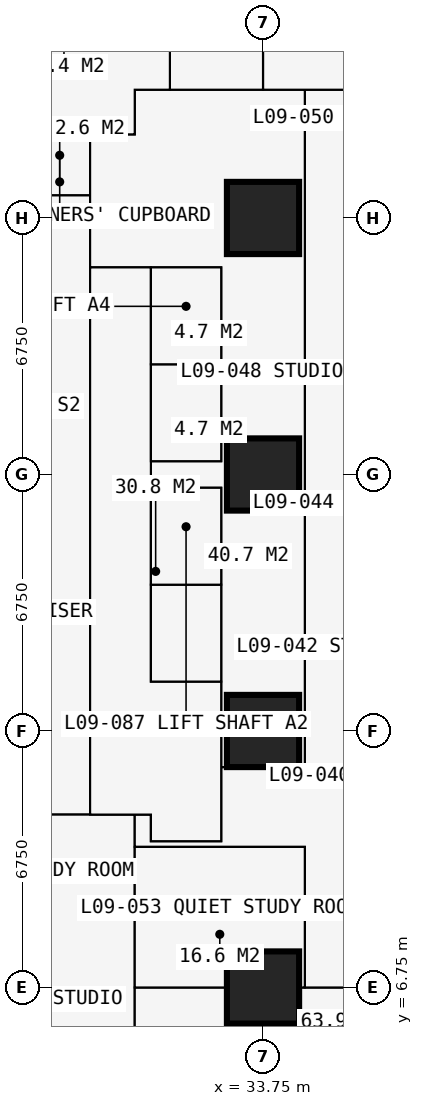
"""IFC4 building model, lengths in metres.
Left out: names, types, materials, properties, quantities, classifications, styles, units other than length and angle.
Written with IfcOpenShell. Run it as: python <this file> out.ifc"""

import sys

from ifc_helpers import new_model, si_unit, direction, frame, frame_2d, origin, origin_2d, place, context, subcontext, project, spatial, rectangle, extrude, element, fill, save


model = new_model("IFC4")
c1 = context("Model", 3, precision=1e-05, world=origin(), true_north=direction((0.0, 1.0)))
c2 = subcontext(c1, "Body", "Model", "MODEL_VIEW")
j1 = project(units=[si_unit("LENGTHUNIT", "METRE"), si_unit("PLANEANGLEUNIT", "RADIAN")], contexts=[c1])
p1 = place(None, origin())
s1 = spatial("IfcSite", under=j1, at=p1, CompositionType="ELEMENT")
p2 = place(p1, origin())
s2 = spatial("IfcBuilding", under=s1, at=p2, CompositionType="ELEMENT")
p3 = place(p2, frame((0.0, 0.0, 36.0)))
s3 = spatial("IfcBuildingStorey", under=s2, at=p3, CompositionType="ELEMENT", Elevation=36.0)
for number, where, z_axis, x_axis in (
    (1, (33.75, 6.75, 0.0), (0.0, 0.0, 1.0), (1.0, 0.0, 0.0)),
    (2, (33.75, 13.5, 0.0), (0.0, 0.0, 1.0), (1.0, 0.0, 0.0)),
    (3, (33.75, 20.25, 0.0), (0.0, 0.0, 1.0), (1.0, 0.0, 0.0)),
    (4, (33.75, 27.0, 0.0), (0.0, 0.0, 1.0), (1.0, 0.0, 0.0)),
):
    element("IfcColumn", number, at=place(p3, frame(where, z_axis=z_axis, x_axis=x_axis)), inside=s3, PredefinedType="COLUMN", context=c2, shape_type="SweptSolid", body=[
        extrude(rectangle(XDim=1.9, YDim=1.9, at=origin_2d()), origin(), (0.0, 0.0, 1.0), 3.6),
    ])
p4 = place(p3, frame((10.125, 11.3, 0.0), z_axis=(0.0, 0.0, 1.0), x_axis=(1.0, 0.0, 0.0)))
e5 = element("IfcWall", 5, at=p4, inside=s3, PredefinedType="PARTITIONING", context=c2, shape_type="SweptSolid", body=[
    extrude(rectangle(XDim=20.675, YDim=0.15, at=frame_2d((10.337, 0.0))), origin(), (0.0, 0.0, 1.0), 3.375),
])
p5 = place(p4, frame((5.2, 0.0, 0.0)))
e6 = element("IfcOpeningElement", 6, at=p5, cuts=e5, PredefinedType="OPENING", context=c2, shape_type="SweptSolid", body=[
    extrude(rectangle(XDim=1.0, YDim=2.2, at=frame_2d((0.5, 1.1))), frame((0.0, 0.085, 0.0), z_axis=(0.0, -1.0, 0.0), x_axis=(1.0, 0.0, 0.0)), (0.0, 0.0, 1.0), 0.17),
])
p6 = place(p4, frame((11.312, 0.0, 0.0)))
e7 = element("IfcOpeningElement", 7, at=p6, cuts=e5, PredefinedType="OPENING", context=c2, shape_type="SweptSolid", body=[
    extrude(rectangle(XDim=1.0, YDim=2.2, at=frame_2d((0.5, 1.1))), frame((0.0, 0.085, 0.0), z_axis=(0.0, -1.0, 0.0), x_axis=(1.0, 0.0, 0.0)), (0.0, 0.0, 1.0), 0.17),
])
p7 = place(p4, frame((2.425, 0.0, 0.0)))
e8 = element("IfcOpeningElement", 8, at=p7, cuts=e5, PredefinedType="OPENING", context=c2, shape_type="SweptSolid", body=[
    extrude(rectangle(XDim=0.95, YDim=2.2, at=frame_2d((0.475, 1.1))), frame((0.0, 0.085, 0.0), z_axis=(0.0, -1.0, 0.0), x_axis=(1.0, 0.0, 0.0)), (0.0, 0.0, 1.0), 0.17),
])
p8 = place(p3, frame((11.3, 29.2, 0.0), z_axis=(0.0, 0.0, 1.0), x_axis=(1.0, 0.0, 0.0)))
e9 = element("IfcWall", 9, at=p8, inside=s3, PredefinedType="PARTITIONING", context=c2, shape_type="SweptSolid", body=[
    extrude(rectangle(XDim=19.075, YDim=0.15, at=frame_2d((9.538, 0.0))), origin(), (0.0, 0.0, 1.0), 3.375),
])
p9 = place(p8, frame((12.875, 0.0, 0.0)))
e10 = element("IfcOpeningElement", 10, at=p9, cuts=e9, PredefinedType="OPENING", context=c2, shape_type="SweptSolid", body=[
    extrude(rectangle(XDim=1.0, YDim=2.2, at=frame_2d((0.5, 1.1))), frame((0.0, 0.085, 0.0), z_axis=(0.0, -1.0, 0.0), x_axis=(1.0, 0.0, 0.0)), (0.0, 0.0, 1.0), 0.17),
])
p10 = place(p8, frame((10.438, 0.0, 0.0)))
e11 = element("IfcOpeningElement", 11, at=p10, cuts=e9, PredefinedType="OPENING", context=c2, shape_type="SweptSolid", body=[
    extrude(rectangle(XDim=1.0, YDim=2.2, at=frame_2d((0.5, 1.1))), frame((0.0, 0.085, 0.0), z_axis=(0.0, -1.0, 0.0), x_axis=(1.0, 0.0, 0.0)), (0.0, 0.0, 1.0), 0.17),
])
p11 = place(p8, frame((14.875, 0.0, 0.0)))
e12 = element("IfcOpeningElement", 12, at=p11, cuts=e9, PredefinedType="OPENING", context=c2, shape_type="SweptSolid", body=[
    extrude(rectangle(XDim=0.95, YDim=2.2, at=frame_2d((0.475, 1.1))), frame((0.0, 0.085, 0.0), z_axis=(0.0, -1.0, 0.0), x_axis=(1.0, 0.0, 0.0)), (0.0, 0.0, 1.0), 0.17),
])
p12 = place(p3, frame((27.6, 27.6, 0.0), z_axis=(0.0, 0.0, 1.0), x_axis=(1.0, 0.0, 0.0)))
e13 = element("IfcWall", 13, at=p12, inside=s3, PredefinedType="PARTITIONING", context=c2, shape_type="SweptSolid", body=[
    extrude(rectangle(XDim=1.6, YDim=0.15, at=frame_2d((0.8, 0.0))), origin(), (0.0, 0.0, 1.0), 2.877),
])
p13 = place(p3, frame((29.2, 11.3, 0.0), z_axis=(0.0, 0.0, 1.0), x_axis=(0.0, 1.0, 0.0)))
e14 = element("IfcWall", 14, at=p13, inside=s3, PredefinedType="PARTITIONING", context=c2, shape_type="SweptSolid", body=[
    extrude(rectangle(XDim=17.9, YDim=0.2, at=frame_2d((8.95, 0.0))), origin(), (0.0, 0.0, 1.0), 3.375),
])
p14 = place(p13, frame((8.35, 0.0, 0.0)))
e15 = element("IfcOpeningElement", 15, at=p14, cuts=e14, PredefinedType="OPENING", context=c2, shape_type="SweptSolid", body=[
    extrude(rectangle(XDim=1.2, YDim=2.2, at=frame_2d((0.6, 1.1))), frame((0.0, 0.11, 0.0), z_axis=(0.0, -1.0, 0.0), x_axis=(1.0, 0.0, 0.0)), (0.0, 0.0, 1.0), 0.22),
])
p15 = place(p3, frame((29.2, 25.7, 0.0), z_axis=(0.0, 0.0, 1.0), x_axis=(1.0, 0.0, 0.0)))
e16 = element("IfcWall", 16, at=p15, inside=s3, PredefinedType="SHEAR", context=c2, shape_type="SweptSolid", body=[
    extrude(rectangle(XDim=3.45, YDim=0.1, at=frame_2d((1.725, 0.0))), origin(), (0.0, 0.0, 1.0), 3.375),
])
p16 = place(p3, frame((30.375, -0.734, 0.0), z_axis=(0.0, 0.0, 1.0), x_axis=(0.0, 1.0, 0.0)))
e17 = element("IfcWall", 17, at=p16, inside=s3, PredefinedType="PARTITIONING", context=c2, shape_type="SweptSolid", body=[
    extrude(rectangle(XDim=12.034, YDim=0.15, at=frame_2d((6.017, 0.0))), origin(), (0.0, 0.0, 1.0), 3.375),
])
p17 = place(p16, frame((5.134, 0.0, 0.0)))
e18 = element("IfcOpeningElement", 18, at=p17, cuts=e17, PredefinedType="OPENING", context=c2, shape_type="SweptSolid", body=[
    extrude(rectangle(XDim=1.0, YDim=2.2, at=frame_2d((0.5, 1.1))), frame((0.0, 0.085, 0.0), z_axis=(0.0, -1.0, 0.0), x_axis=(1.0, 0.0, 0.0)), (0.0, 0.0, 1.0), 0.17),
])
p18 = place(p3, frame((30.375, 6.75, 0.0), z_axis=(0.0, 0.0, 1.0), x_axis=(1.0, 0.0, 0.0)))
e19 = element("IfcWall", 19, at=p18, inside=s3, PredefinedType="PARTITIONING", context=c2, shape_type="SweptSolid", body=[
    extrude(rectangle(XDim=5.975, YDim=0.15, at=frame_2d((2.988, 0.0))), origin(), (0.0, 0.0, 1.0), 2.877),
])
p19 = place(p3, frame((30.375, 10.45, 0.0), z_axis=(0.0, 0.0, 1.0), x_axis=(1.0, 0.0, 0.0)))
e20 = element("IfcWall", 20, at=p19, inside=s3, PredefinedType="PARTITIONING", context=c2, shape_type="SweptSolid", body=[
    extrude(rectangle(XDim=4.475, YDim=0.15, at=frame_2d((2.238, 0.0))), origin(), (0.0, 0.0, 1.0), 3.375),
])
p20 = place(p19, frame((2.35, 0.0, 0.0)))
e21 = element("IfcOpeningElement", 21, at=p20, cuts=e20, PredefinedType="OPENING", context=c2, shape_type="SweptSolid", body=[
    extrude(rectangle(XDim=0.95, YDim=2.2, at=frame_2d((0.475, 1.1))), frame((0.0, 0.085, 0.0), z_axis=(0.0, -1.0, 0.0), x_axis=(1.0, 0.0, 0.0)), (0.0, 0.0, 1.0), 0.17),
])
p21 = place(p3, frame((30.375, 29.2, 0.0), z_axis=(0.0, 0.0, 1.0), x_axis=(0.0, 1.0, 0.0)))
e22 = element("IfcWall", 22, at=p21, inside=s3, PredefinedType="PARTITIONING", context=c2, shape_type="SweptSolid", body=[
    extrude(rectangle(XDim=1.175, YDim=0.15, at=frame_2d((0.587, 0.0))), origin(), (0.0, 0.0, 1.0), 3.375),
])
p22 = place(p3, frame((30.375, 30.375, 0.0), z_axis=(0.0, 0.0, 1.0), x_axis=(1.0, 0.0, 0.0)))
e23 = element("IfcWall", 23, at=p22, inside=s3, PredefinedType="PARTITIONING", context=c2, shape_type="SweptSolid", body=[
    extrude(rectangle(XDim=10.859, YDim=0.15, at=frame_2d((5.429, 0.0))), origin(), (0.0, 0.0, 1.0), 3.375),
])
p23 = place(p3, frame((30.8, 10.6, 0.0), z_axis=(0.0, 0.0, 1.0), x_axis=(0.0, 1.0, 0.0)))
e24 = element("IfcWall", 24, at=p23, inside=s3, PredefinedType="PARTITIONING", context=c2, shape_type="SweptSolid", body=[
    extrude(rectangle(XDim=0.7, YDim=0.15, at=frame_2d((0.35, 0.0))), origin(), (0.0, 0.0, 1.0), 3.375),
])
p24 = place(p3, frame((30.8, 10.6, 0.0), z_axis=(0.0, 0.0, 1.0), x_axis=(1.0, 0.0, 0.0)))
e25 = element("IfcWall", 25, at=p24, inside=s3, PredefinedType="PARTITIONING", context=c2, shape_type="SweptSolid", body=[
    extrude(rectangle(XDim=1.85, YDim=0.15, at=frame_2d((0.925, 0.0))), origin(), (0.0, 0.0, 1.0), 3.375),
])
p25 = place(p3, frame((30.8, 14.8, 0.0), z_axis=(0.0, 0.0, 1.0), x_axis=(0.0, 1.0, 0.0)))
e26 = element("IfcWall", 26, at=p25, inside=s3, PredefinedType="PARTITIONING", context=c2, shape_type="SweptSolid", body=[
    extrude(rectangle(XDim=10.9, YDim=0.15, at=frame_2d((5.45, 0.0))), origin(), (0.0, 0.0, 1.0), 3.375),
])
p26 = place(p25, frame((0.75, 0.0, 0.0)))
e27 = element("IfcOpeningElement", 27, at=p26, cuts=e26, PredefinedType="OPENING", context=c2, shape_type="SweptSolid", body=[
    extrude(rectangle(XDim=1.1, YDim=2.2, at=frame_2d((0.55, 1.1))), frame((0.0, 0.085, 0.0), z_axis=(0.0, -1.0, 0.0), x_axis=(1.0, 0.0, 0.0)), (0.0, 0.0, 1.0), 0.17),
])
p27 = place(p25, frame((3.25, 0.0, 0.0)))
e28 = element("IfcOpeningElement", 28, at=p27, cuts=e26, PredefinedType="OPENING", context=c2, shape_type="SweptSolid", body=[
    extrude(rectangle(XDim=1.1, YDim=2.2, at=frame_2d((0.55, 1.1))), frame((0.0, 0.085, 0.0), z_axis=(0.0, -1.0, 0.0), x_axis=(1.0, 0.0, 0.0)), (0.0, 0.0, 1.0), 0.17),
])
p28 = place(p25, frame((6.5, 0.0, 0.0)))
e29 = element("IfcOpeningElement", 29, at=p28, cuts=e26, PredefinedType="OPENING", context=c2, shape_type="SweptSolid", body=[
    extrude(rectangle(XDim=1.1, YDim=2.2, at=frame_2d((0.55, 1.1))), frame((0.0, 0.085, 0.0), z_axis=(0.0, -1.0, 0.0), x_axis=(1.0, 0.0, 0.0)), (0.0, 0.0, 1.0), 0.17),
])
p29 = place(p25, frame((9.05, 0.0, 0.0)))
e30 = element("IfcOpeningElement", 30, at=p29, cuts=e26, PredefinedType="OPENING", context=c2, shape_type="SweptSolid", body=[
    extrude(rectangle(XDim=1.1, YDim=2.2, at=frame_2d((0.55, 1.1))), frame((0.0, 0.085, 0.0), z_axis=(0.0, -1.0, 0.0), x_axis=(1.0, 0.0, 0.0)), (0.0, 0.0, 1.0), 0.17),
])
for number, where, z_axis, x_axis in (
    (31, (30.8, 14.8, 0.0), (0.0, 0.0, 1.0), (1.0, 0.0, 0.0)),
    (32, (30.8, 17.35, 0.0), (0.0, 0.0, 1.0), (1.0, 0.0, 0.0)),
    (33, (30.8, 19.9, 0.0), (0.0, 0.0, 1.0), (1.0, 0.0, 0.0)),
    (34, (30.8, 20.6, 0.0), (0.0, 0.0, 1.0), (1.0, 0.0, 0.0)),
    (35, (30.8, 23.15, 0.0), (0.0, 0.0, 1.0), (1.0, 0.0, 0.0)),
):
    element("IfcWall", number, at=place(p3, frame(where, z_axis=z_axis, x_axis=x_axis)), inside=s3, PredefinedType="SHEAR", context=c2, shape_type="SweptSolid", body=[
        extrude(rectangle(XDim=1.85, YDim=0.1, at=frame_2d((0.925, 0.0))), origin(), (0.0, 0.0, 1.0), 3.375),
    ])
p30 = place(p3, frame((31.3, 30.375, 0.0), z_axis=(0.0, 0.0, 1.0), x_axis=(0.0, 1.0, 0.0)))
e36 = element("IfcWall", 36, at=p30, inside=s3, PredefinedType="PARTITIONING", context=c2, shape_type="SweptSolid", body=[
    extrude(rectangle(XDim=4.475, YDim=0.15, at=frame_2d((2.238, 0.0))), origin(), (0.0, 0.0, 1.0), 3.375),
])
p31 = place(p3, frame((32.65, 10.6, 0.0), z_axis=(0.0, 0.0, 1.0), x_axis=(0.0, 1.0, 0.0)))
e37 = element("IfcWall", 37, at=p31, inside=s3, PredefinedType="SHEAR", context=c2, shape_type="SweptSolid", body=[
    extrude(rectangle(XDim=9.3, YDim=0.1, at=frame_2d((4.65, 0.0))), origin(), (0.0, 0.0, 1.0), 3.375),
])
p32 = place(p31, frame((0.5, 0.0, 0.0)))
e38 = element("IfcOpeningElement", 38, at=p32, cuts=e37, PredefinedType="OPENING", context=c2, shape_type="SweptSolid", body=[
    extrude(rectangle(XDim=1.0, YDim=2.2, at=frame_2d((0.5, 1.1))), frame((0.0, 0.06, 0.0), z_axis=(0.0, -1.0, 0.0), x_axis=(1.0, 0.0, 0.0)), (0.0, 0.0, 1.0), 0.12),
])
p33 = place(p3, frame((32.65, 12.55, 0.0), z_axis=(0.0, 0.0, 1.0), x_axis=(1.0, 0.0, 0.0)))
e39 = element("IfcWall", 39, at=p33, inside=s3, PredefinedType="PARTITIONING", context=c2, shape_type="SweptSolid", body=[
    extrude(rectangle(XDim=2.2, YDim=0.15, at=frame_2d((1.1, 0.0))), origin(), (0.0, 0.0, 1.0), 3.375),
])
p34 = place(p3, frame((32.65, 20.6, 0.0), z_axis=(0.0, 0.0, 1.0), x_axis=(0.0, 1.0, 0.0)))
e40 = element("IfcWall", 40, at=p34, inside=s3, PredefinedType="PARTITIONING", context=c2, shape_type="SweptSolid", body=[
    extrude(rectangle(XDim=5.1, YDim=0.15, at=frame_2d((2.55, 0.0))), origin(), (0.0, 0.0, 1.0), 3.375),
])
p35 = place(p3, frame((33.75, 30.375, 0.0), z_axis=(0.0, 0.0, 1.0), x_axis=(0.0, 1.0, 0.0)))
e41 = element("IfcWall", 41, at=p35, inside=s3, PredefinedType="PARTITIONING", context=c2, shape_type="SweptSolid", body=[
    extrude(rectangle(XDim=10.859, YDim=0.15, at=frame_2d((5.429, 0.0))), origin(), (0.0, 0.0, 1.0), 2.877),
])
p36 = place(p35, frame((1.4, 0.0, 0.0)))
e42 = element("IfcOpeningElement", 42, at=p36, cuts=e41, PredefinedType="OPENING", context=c2, shape_type="SweptSolid", body=[
    extrude(rectangle(XDim=1.0, YDim=2.2, at=frame_2d((0.5, 1.1))), frame((0.0, 0.085, 0.0), z_axis=(0.0, -1.0, 0.0), x_axis=(1.0, 0.0, 0.0)), (0.0, 0.0, 1.0), 0.17),
])
p37 = place(p3, frame((34.85, 6.75, 0.0), z_axis=(0.0, 0.0, 1.0), x_axis=(0.0, 1.0, 0.0)))
e43 = element("IfcWall", 43, at=p37, inside=s3, PredefinedType="PARTITIONING", context=c2, shape_type="SweptSolid", body=[
    extrude(rectangle(XDim=3.7, YDim=0.15, at=frame_2d((1.85, 0.0))), origin(), (0.0, 0.0, 1.0), 3.375),
])
p38 = place(p3, frame((34.85, 12.55, 0.0), z_axis=(0.0, 0.0, 1.0), x_axis=(0.0, 1.0, 0.0)))
e44 = element("IfcWall", 44, at=p38, inside=s3, PredefinedType="PARTITIONING", context=c2, shape_type="SweptSolid", body=[
    extrude(rectangle(XDim=17.825, YDim=0.15, at=frame_2d((8.913, 0.0))), origin(), (0.0, 0.0, 1.0), 3.375),
])
p39 = place(p38, frame((8.65, 0.0, 0.0)))
e45 = element("IfcOpeningElement", 45, at=p39, cuts=e44, PredefinedType="OPENING", context=c2, shape_type="SweptSolid", body=[
    extrude(rectangle(XDim=0.95, YDim=2.2, at=frame_2d((0.475, 1.1))), frame((0.0, 0.085, 0.0), z_axis=(0.0, -1.0, 0.0), x_axis=(1.0, 0.0, 0.0)), (0.0, 0.0, 1.0), 0.17),
])
p40 = place(p32, origin())
e46 = element("IfcDoor", 46, at=p40, inside=s3, OperationType="SINGLE_SWING_LEFT", PredefinedType="DOOR", context=c2, shape_type="SweptSolid", body=[
    extrude(rectangle(XDim=1.0, YDim=2.2, at=frame_2d((0.5, 1.1))), frame((0.0, 0.025, 0.0), z_axis=(0.0, -1.0, 0.0), x_axis=(1.0, 0.0, 0.0)), (0.0, 0.0, 1.0), 0.05),
])
fill(e38, e46)
p41 = place(p39, origin())
e47 = element("IfcDoor", 47, at=p41, inside=s3, OperationType="SINGLE_SWING_LEFT", PredefinedType="DOOR", context=c2, shape_type="SweptSolid", body=[
    extrude(rectangle(XDim=0.95, YDim=2.2, at=frame_2d((0.475, 1.1))), frame((0.0, 0.025, 0.0), z_axis=(0.0, -1.0, 0.0), x_axis=(1.0, 0.0, 0.0)), (0.0, 0.0, 1.0), 0.05),
])
fill(e45, e47)
p42 = place(p20, origin())
e48 = element("IfcDoor", 48, at=p42, inside=s3, OperationType="SINGLE_SWING_LEFT", PredefinedType="DOOR", context=c2, shape_type="SweptSolid", body=[
    extrude(rectangle(XDim=0.95, YDim=2.2, at=frame_2d((0.475, 1.1))), frame((0.0, 0.025, 0.0), z_axis=(0.0, -1.0, 0.0), x_axis=(1.0, 0.0, 0.0)), (0.0, 0.0, 1.0), 0.05),
])
fill(e21, e48)
p43 = place(p26, origin())
e49 = element("IfcDoor", 49, at=p43, inside=s3, OperationType="DOUBLE_DOOR_SLIDING", PredefinedType="DOOR", context=c2, shape_type="SweptSolid", body=[
    extrude(rectangle(XDim=1.1, YDim=2.2, at=frame_2d((0.55, 1.1))), frame((0.0, 0.025, 0.0), z_axis=(0.0, -1.0, 0.0), x_axis=(1.0, 0.0, 0.0)), (0.0, 0.0, 1.0), 0.05),
])
fill(e27, e49)
p44 = place(p27, origin())
e50 = element("IfcDoor", 50, at=p44, inside=s3, OperationType="DOUBLE_DOOR_SLIDING", PredefinedType="DOOR", context=c2, shape_type="SweptSolid", body=[
    extrude(rectangle(XDim=1.1, YDim=2.2, at=frame_2d((0.55, 1.1))), frame((0.0, 0.025, 0.0), z_axis=(0.0, -1.0, 0.0), x_axis=(1.0, 0.0, 0.0)), (0.0, 0.0, 1.0), 0.05),
])
fill(e28, e50)
p45 = place(p28, origin())
e51 = element("IfcDoor", 51, at=p45, inside=s3, OperationType="DOUBLE_DOOR_SLIDING", PredefinedType="DOOR", context=c2, shape_type="SweptSolid", body=[
    extrude(rectangle(XDim=1.1, YDim=2.2, at=frame_2d((0.55, 1.1))), frame((0.0, 0.025, 0.0), z_axis=(0.0, -1.0, 0.0), x_axis=(1.0, 0.0, 0.0)), (0.0, 0.0, 1.0), 0.05),
])
fill(e29, e51)
p46 = place(p29, origin())
e52 = element("IfcDoor", 52, at=p46, inside=s3, OperationType="DOUBLE_DOOR_SLIDING", PredefinedType="DOOR", context=c2, shape_type="SweptSolid", body=[
    extrude(rectangle(XDim=1.1, YDim=2.2, at=frame_2d((0.55, 1.1))), frame((0.0, 0.025, 0.0), z_axis=(0.0, -1.0, 0.0), x_axis=(1.0, 0.0, 0.0)), (0.0, 0.0, 1.0), 0.05),
])
fill(e30, e52)
p47 = place(p14, origin())
e53 = element("IfcDoor", 53, at=p47, inside=s3, OperationType="DOUBLE_DOOR_SINGLE_SWING", PredefinedType="DOOR", context=c2, shape_type="SweptSolid", body=[
    extrude(rectangle(XDim=1.2, YDim=2.2, at=frame_2d((0.6, 1.1))), frame((0.0, 0.025, 0.0), z_axis=(0.0, -1.0, 0.0), x_axis=(1.0, 0.0, 0.0)), (0.0, 0.0, 1.0), 0.05),
])
fill(e15, e53)
save(model, sys.argv[1])
